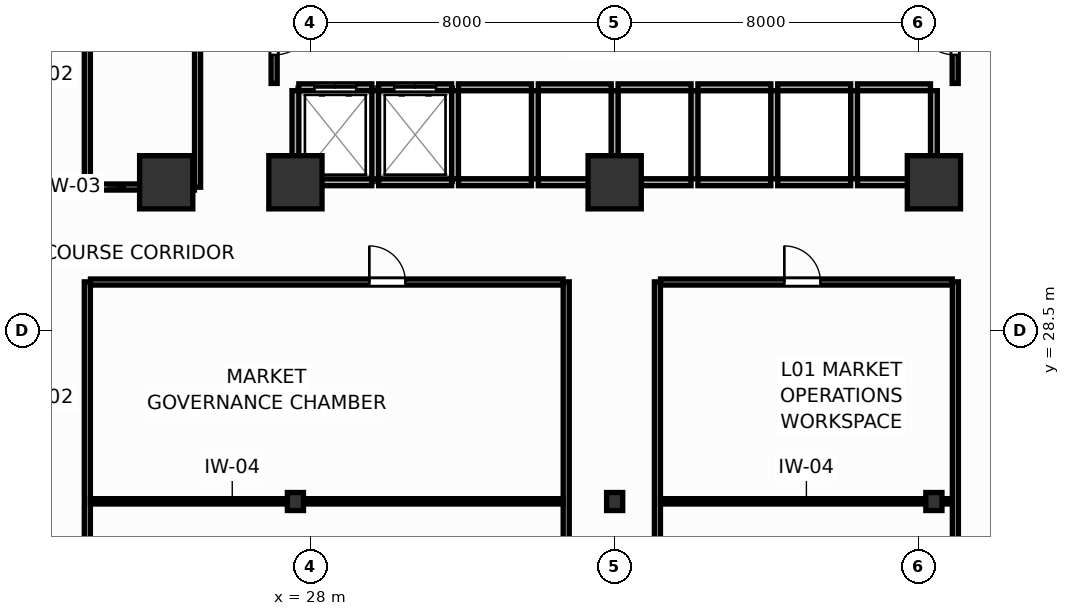
"""IFC4 building model, lengths in metres.
Left out: names, types, materials, properties, quantities, classifications, styles, units other than length and angle.
Written with IfcOpenShell. Run it as: python <this file> out.ifc"""

import sys

from ifc_helpers import new_model, si_unit, direction, frame, frame_2d, origin, origin_2d, place, context, subcontext, project, spatial, rectangle, i_section, extrude, source, transform, mapped, element, fill, save


model = new_model("IFC4")
c1 = context("Model", 3, precision=1e-05, world=origin(), true_north=direction((0.0, 1.0)))
c2 = subcontext(c1, "Body", "Model", "MODEL_VIEW")
j1 = project(units=[si_unit("LENGTHUNIT", "METRE"), si_unit("PLANEANGLEUNIT", "RADIAN")], contexts=[c1])
p1 = place(None, origin())
s1 = spatial("IfcSite", under=j1, at=p1, CompositionType="ELEMENT")
p2 = place(p1, origin())
s2 = spatial("IfcBuilding", under=s1, at=p2, CompositionType="ELEMENT")
p3 = place(p2, frame((0.0, 0.0, 4.8)))
s3 = spatial("IfcBuildingStorey", under=s2, at=p3, CompositionType="ELEMENT", Elevation=4.8)
m1 = source(origin(), c2, "Body", "SweptSolid", [
    extrude(rectangle(XDim=1.4, YDim=1.4, at=origin_2d()), origin(), (0.0, 0.0, 1.0), 4.8),
])
for number, where, z_axis, x_axis in (
    (1, (27.6, 32.4, 0.0), (0.0, 0.0, 1.0), (1.0, 0.0, 0.0)),
    (2, (44.4, 32.4, 0.0), (0.0, 0.0, 1.0), (1.0, 0.0, 0.0)),
    (3, (36.0, 32.4, 0.0), (0.0, 0.0, 1.0), (1.0, 0.0, 0.0)),
    (4, (24.2, 32.4, 0.0), (0.0, 0.0, 1.0), (1.0, 0.0, 0.0)),
):
    element("IfcColumn", number, at=place(p3, frame(where, z_axis=z_axis, x_axis=x_axis)), inside=s3, PredefinedType="COLUMN", context=c2, shape_type="MappedRepresentation", body=[
        mapped(m1, transform((0.0, 0.0, 0.0), scale=1.0)),
    ])
m2 = source(origin(), c2, "Body", "SweptSolid", [
    extrude(i_section(OverallWidth=0.424, OverallDepth=0.474, WebThickness=0.045, FlangeThickness=0.072, FilletRadius=0.015, at=origin_2d()), origin(), (0.0, 0.0, 1.0), 4.8),
])
for number, where, z_axis, x_axis in (
    (5, (27.6, 24.0, 0.0), (0.0, 0.0, 1.0), (1.0, 0.0, 0.0)),
    (6, (44.4, 24.0, 0.0), (0.0, 0.0, 1.0), (1.0, 0.0, 0.0)),
    (7, (36.0, 24.0, 0.0), (0.0, 0.0, 1.0), (1.0, 0.0, 0.0)),
):
    element("IfcColumn", number, at=place(p3, frame(where, z_axis=z_axis, x_axis=x_axis)), inside=s3, PredefinedType="COLUMN", context=c2, shape_type="MappedRepresentation", body=[
        mapped(m2, transform((0.0, 0.0, 0.0), scale=1.0)),
    ])
p4 = place(p3, frame((27.69, 34.9, 0.0), z_axis=(0.0, 0.0, 1.0), x_axis=(1.0, 0.0, 0.0)))
e8 = element("IfcWall", 8, at=p4, inside=s3, PredefinedType="PARTITIONING", context=c2, shape_type="SweptSolid", body=[
    extrude(rectangle(XDim=1.92, YDim=0.18, at=frame_2d((0.96, 0.0))), origin(), (0.0, 0.0, 1.0), 4.52),
])
p5 = place(p4, frame((0.41, 0.0, 0.0)))
e9 = element("IfcOpeningElement", 9, at=p5, cuts=e8, PredefinedType="OPENING", context=c2, shape_type="SweptSolid", body=[
    extrude(rectangle(XDim=1.1, YDim=2.1, at=frame_2d((0.55, 1.05))), frame((0.0, 0.1, 0.0), z_axis=(0.0, -1.0, 0.0), x_axis=(1.0, 0.0, 0.0)), (0.0, 0.0, 1.0), 0.2),
])
p6 = place(p3, frame((27.69, 32.4, 0.0), z_axis=(0.0, 0.0, 1.0), x_axis=(1.0, 0.0, 0.0)))
e10 = element("IfcWall", 10, at=p6, inside=s3, PredefinedType="PARTITIONING", context=c2, shape_type="SweptSolid", body=[
    extrude(rectangle(XDim=1.92, YDim=0.18, at=frame_2d((0.96, 0.0))), origin(), (0.0, 0.0, 1.0), 3.82),
])
p7 = place(p3, frame((27.6, 32.49, 0.0), z_axis=(0.0, 0.0, 1.0), x_axis=(0.0, 1.0, 0.0)))
e11 = element("IfcWall", 11, at=p7, inside=s3, PredefinedType="PARTITIONING", context=c2, shape_type="SweptSolid", body=[
    extrude(rectangle(XDim=2.32, YDim=0.18, at=frame_2d((1.16, 0.0))), origin(), (0.0, 0.0, 1.0), 4.52),
])
p8 = place(p3, frame((29.79, 34.9, 0.0), z_axis=(0.0, 0.0, 1.0), x_axis=(1.0, 0.0, 0.0)))
e12 = element("IfcWall", 12, at=p8, inside=s3, PredefinedType="PARTITIONING", context=c2, shape_type="SweptSolid", body=[
    extrude(rectangle(XDim=1.92, YDim=0.18, at=frame_2d((0.96, 0.0))), origin(), (0.0, 0.0, 1.0), 4.52),
])
p9 = place(p8, frame((0.41, 0.0, 0.0)))
e13 = element("IfcOpeningElement", 13, at=p9, cuts=e12, PredefinedType="OPENING", context=c2, shape_type="SweptSolid", body=[
    extrude(rectangle(XDim=1.1, YDim=2.1, at=frame_2d((0.55, 1.05))), frame((0.0, 0.1, 0.0), z_axis=(0.0, -1.0, 0.0), x_axis=(1.0, 0.0, 0.0)), (0.0, 0.0, 1.0), 0.2),
])
p10 = place(p3, frame((29.79, 32.4, 0.0), z_axis=(0.0, 0.0, 1.0), x_axis=(1.0, 0.0, 0.0)))
e14 = element("IfcWall", 14, at=p10, inside=s3, PredefinedType="PARTITIONING", context=c2, shape_type="SweptSolid", body=[
    extrude(rectangle(XDim=1.92, YDim=0.18, at=frame_2d((0.96, 0.0))), origin(), (0.0, 0.0, 1.0), 3.82),
])
p11 = place(p3, frame((29.7, 32.49, 0.0), z_axis=(0.0, 0.0, 1.0), x_axis=(0.0, 1.0, 0.0)))
e15 = element("IfcWall", 15, at=p11, inside=s3, PredefinedType="PARTITIONING", context=c2, shape_type="SweptSolid", body=[
    extrude(rectangle(XDim=2.32, YDim=0.18, at=frame_2d((1.16, 0.0))), origin(), (0.0, 0.0, 1.0), 4.52),
])
p12 = place(p3, frame((31.89, 34.9, 0.0), z_axis=(0.0, 0.0, 1.0), x_axis=(1.0, 0.0, 0.0)))
e16 = element("IfcWall", 16, at=p12, inside=s3, PredefinedType="PARTITIONING", context=c2, shape_type="SweptSolid", body=[
    extrude(rectangle(XDim=1.92, YDim=0.18, at=frame_2d((0.96, 0.0))), origin(), (0.0, 0.0, 1.0), 4.52),
])
p13 = place(p3, frame((31.89, 32.4, 0.0), z_axis=(0.0, 0.0, 1.0), x_axis=(1.0, 0.0, 0.0)))
e17 = element("IfcWall", 17, at=p13, inside=s3, PredefinedType="PARTITIONING", context=c2, shape_type="SweptSolid", body=[
    extrude(rectangle(XDim=1.92, YDim=0.18, at=frame_2d((0.96, 0.0))), origin(), (0.0, 0.0, 1.0), 3.82),
])
p14 = place(p3, frame((31.8, 32.49, 0.0), z_axis=(0.0, 0.0, 1.0), x_axis=(0.0, 1.0, 0.0)))
e18 = element("IfcWall", 18, at=p14, inside=s3, PredefinedType="PARTITIONING", context=c2, shape_type="SweptSolid", body=[
    extrude(rectangle(XDim=2.32, YDim=0.18, at=frame_2d((1.16, 0.0))), origin(), (0.0, 0.0, 1.0), 4.52),
])
p15 = place(p3, frame((33.99, 34.9, 0.0), z_axis=(0.0, 0.0, 1.0), x_axis=(1.0, 0.0, 0.0)))
e19 = element("IfcWall", 19, at=p15, inside=s3, PredefinedType="PARTITIONING", context=c2, shape_type="SweptSolid", body=[
    extrude(rectangle(XDim=1.92, YDim=0.18, at=frame_2d((0.96, 0.0))), origin(), (0.0, 0.0, 1.0), 4.52),
])
p16 = place(p3, frame((33.99, 32.4, 0.0), z_axis=(0.0, 0.0, 1.0), x_axis=(1.0, 0.0, 0.0)))
e20 = element("IfcWall", 20, at=p16, inside=s3, PredefinedType="PARTITIONING", context=c2, shape_type="SweptSolid", body=[
    extrude(rectangle(XDim=1.92, YDim=0.18, at=frame_2d((0.96, 0.0))), origin(), (0.0, 0.0, 1.0), 3.82),
])
p17 = place(p3, frame((33.9, 32.49, 0.0), z_axis=(0.0, 0.0, 1.0), x_axis=(0.0, 1.0, 0.0)))
e21 = element("IfcWall", 21, at=p17, inside=s3, PredefinedType="PARTITIONING", context=c2, shape_type="SweptSolid", body=[
    extrude(rectangle(XDim=2.32, YDim=0.18, at=frame_2d((1.16, 0.0))), origin(), (0.0, 0.0, 1.0), 4.52),
])
p18 = place(p3, frame((36.09, 34.9, 0.0), z_axis=(0.0, 0.0, 1.0), x_axis=(1.0, 0.0, 0.0)))
e22 = element("IfcWall", 22, at=p18, inside=s3, PredefinedType="PARTITIONING", context=c2, shape_type="SweptSolid", body=[
    extrude(rectangle(XDim=1.92, YDim=0.18, at=frame_2d((0.96, 0.0))), origin(), (0.0, 0.0, 1.0), 4.52),
])
p19 = place(p3, frame((36.09, 32.4, 0.0), z_axis=(0.0, 0.0, 1.0), x_axis=(1.0, 0.0, 0.0)))
e23 = element("IfcWall", 23, at=p19, inside=s3, PredefinedType="PARTITIONING", context=c2, shape_type="SweptSolid", body=[
    extrude(rectangle(XDim=1.92, YDim=0.18, at=frame_2d((0.96, 0.0))), origin(), (0.0, 0.0, 1.0), 3.82),
])
p20 = place(p3, frame((36.0, 32.49, 0.0), z_axis=(0.0, 0.0, 1.0), x_axis=(0.0, 1.0, 0.0)))
e24 = element("IfcWall", 24, at=p20, inside=s3, PredefinedType="PARTITIONING", context=c2, shape_type="SweptSolid", body=[
    extrude(rectangle(XDim=2.32, YDim=0.18, at=frame_2d((1.16, 0.0))), origin(), (0.0, 0.0, 1.0), 4.52),
])
p21 = place(p3, frame((38.19, 34.9, 0.0), z_axis=(0.0, 0.0, 1.0), x_axis=(1.0, 0.0, 0.0)))
e25 = element("IfcWall", 25, at=p21, inside=s3, PredefinedType="PARTITIONING", context=c2, shape_type="SweptSolid", body=[
    extrude(rectangle(XDim=1.92, YDim=0.18, at=frame_2d((0.96, 0.0))), origin(), (0.0, 0.0, 1.0), 4.52),
])
p22 = place(p3, frame((38.19, 32.4, 0.0), z_axis=(0.0, 0.0, 1.0), x_axis=(1.0, 0.0, 0.0)))
e26 = element("IfcWall", 26, at=p22, inside=s3, PredefinedType="PARTITIONING", context=c2, shape_type="SweptSolid", body=[
    extrude(rectangle(XDim=1.92, YDim=0.18, at=frame_2d((0.96, 0.0))), origin(), (0.0, 0.0, 1.0), 3.82),
])
p23 = place(p3, frame((38.1, 32.49, 0.0), z_axis=(0.0, 0.0, 1.0), x_axis=(0.0, 1.0, 0.0)))
e27 = element("IfcWall", 27, at=p23, inside=s3, PredefinedType="PARTITIONING", context=c2, shape_type="SweptSolid", body=[
    extrude(rectangle(XDim=2.32, YDim=0.18, at=frame_2d((1.16, 0.0))), origin(), (0.0, 0.0, 1.0), 4.52),
])
p24 = place(p3, frame((40.29, 34.9, 0.0), z_axis=(0.0, 0.0, 1.0), x_axis=(1.0, 0.0, 0.0)))
e28 = element("IfcWall", 28, at=p24, inside=s3, PredefinedType="PARTITIONING", context=c2, shape_type="SweptSolid", body=[
    extrude(rectangle(XDim=1.92, YDim=0.18, at=frame_2d((0.96, 0.0))), origin(), (0.0, 0.0, 1.0), 4.52),
])
p25 = place(p3, frame((40.29, 32.4, 0.0), z_axis=(0.0, 0.0, 1.0), x_axis=(1.0, 0.0, 0.0)))
e29 = element("IfcWall", 29, at=p25, inside=s3, PredefinedType="PARTITIONING", context=c2, shape_type="SweptSolid", body=[
    extrude(rectangle(XDim=1.92, YDim=0.18, at=frame_2d((0.96, 0.0))), origin(), (0.0, 0.0, 1.0), 3.82),
])
p26 = place(p3, frame((40.2, 32.49, 0.0), z_axis=(0.0, 0.0, 1.0), x_axis=(0.0, 1.0, 0.0)))
e30 = element("IfcWall", 30, at=p26, inside=s3, PredefinedType="PARTITIONING", context=c2, shape_type="SweptSolid", body=[
    extrude(rectangle(XDim=2.32, YDim=0.18, at=frame_2d((1.16, 0.0))), origin(), (0.0, 0.0, 1.0), 4.52),
])
p27 = place(p3, frame((42.39, 34.9, 0.0), z_axis=(0.0, 0.0, 1.0), x_axis=(1.0, 0.0, 0.0)))
e31 = element("IfcWall", 31, at=p27, inside=s3, PredefinedType="PARTITIONING", context=c2, shape_type="SweptSolid", body=[
    extrude(rectangle(XDim=1.92, YDim=0.18, at=frame_2d((0.96, 0.0))), origin(), (0.0, 0.0, 1.0), 4.52),
])
p28 = place(p3, frame((42.39, 32.4, 0.0), z_axis=(0.0, 0.0, 1.0), x_axis=(1.0, 0.0, 0.0)))
e32 = element("IfcWall", 32, at=p28, inside=s3, PredefinedType="PARTITIONING", context=c2, shape_type="SweptSolid", body=[
    extrude(rectangle(XDim=1.92, YDim=0.18, at=frame_2d((0.96, 0.0))), origin(), (0.0, 0.0, 1.0), 3.82),
])
for number, where, z_axis, x_axis in (
    (33, (42.3, 32.49, 0.0), (0.0, 0.0, 1.0), (0.0, 1.0, 0.0)),
    (34, (44.4, 32.49, 0.0), (0.0, 0.0, 1.0), (0.0, 1.0, 0.0)),
):
    element("IfcWall", number, at=place(p3, frame(where, z_axis=z_axis, x_axis=x_axis)), inside=s3, PredefinedType="PARTITIONING", context=c2, shape_type="SweptSolid", body=[
        extrude(rectangle(XDim=2.32, YDim=0.18, at=frame_2d((1.16, 0.0))), origin(), (0.0, 0.0, 1.0), 4.52),
    ])
p29 = place(p3, frame((27.04, 35.0, 0.0), z_axis=(0.0, 0.0, 1.0), x_axis=(0.0, 1.0, 0.0)))
e35 = element("IfcWall", 35, at=p29, inside=s3, PredefinedType="PARTITIONING", context=c2, shape_type="SweptSolid", body=[
    extrude(rectangle(XDim=2.65, YDim=0.16, at=frame_2d((1.325, 0.0))), origin(), (0.0, 0.0, 1.0), 4.52),
])
p30 = place(p29, frame((0.75, 0.0, 0.0)))
e36 = element("IfcOpeningElement", 36, at=p30, cuts=e35, PredefinedType="OPENING", context=c2, shape_type="SweptSolid", body=[
    extrude(rectangle(XDim=1.05, YDim=2.1, at=frame_2d((0.525, 1.05))), frame((0.0, 0.09, 0.0), z_axis=(0.0, -1.0, 0.0), x_axis=(1.0, 0.0, 0.0)), (0.0, 0.0, 1.0), 0.18),
])
p31 = place(p3, frame((44.96, 35.0, 0.0), z_axis=(0.0, 0.0, 1.0), x_axis=(0.0, 1.0, 0.0)))
e37 = element("IfcWall", 37, at=p31, inside=s3, PredefinedType="PARTITIONING", context=c2, shape_type="SweptSolid", body=[
    extrude(rectangle(XDim=2.65, YDim=0.16, at=frame_2d((1.325, 0.0))), origin(), (0.0, 0.0, 1.0), 4.52),
])
p32 = place(p31, frame((0.75, 0.0, 0.0)))
e38 = element("IfcOpeningElement", 38, at=p32, cuts=e37, PredefinedType="OPENING", context=c2, shape_type="SweptSolid", body=[
    extrude(rectangle(XDim=1.05, YDim=2.1, at=frame_2d((0.525, 1.05))), frame((0.0, 0.09, 0.0), z_axis=(0.0, -1.0, 0.0), x_axis=(1.0, 0.0, 0.0)), (0.0, 0.0, 1.0), 0.18),
])
p33 = place(p3, frame((44.965, 3.02, 0.0), z_axis=(0.0, 0.0, 1.0), x_axis=(0.0, 1.0, 0.0)))
e39 = element("IfcWall", 39, at=p33, inside=s3, PredefinedType="PARTITIONING", context=c2, shape_type="SweptSolid", body=[
    extrude(rectangle(XDim=26.76, YDim=0.16, at=frame_2d((13.38, 0.0))), origin(), (0.0, 0.0, 1.0), 4.52),
])
p34 = place(p33, frame((6.82, 0.0, 0.0)))
e40 = element("IfcOpeningElement", 40, at=p34, cuts=e39, PredefinedType="OPENING", context=c2, shape_type="SweptSolid", body=[
    extrude(rectangle(XDim=0.95, YDim=2.05, at=frame_2d((0.475, 1.025))), frame((0.0, 0.09, 0.0), z_axis=(0.0, -1.0, 0.0), x_axis=(1.0, 0.0, 0.0)), (0.0, 0.0, 1.0), 0.18),
])
p35 = place(p3, frame((37.125, 3.02, 0.0), z_axis=(0.0, 0.0, 1.0), x_axis=(0.0, 1.0, 0.0)))
e41 = element("IfcWall", 41, at=p35, inside=s3, PredefinedType="PARTITIONING", context=c2, shape_type="SweptSolid", body=[
    extrude(rectangle(XDim=26.76, YDim=0.16, at=frame_2d((13.38, 0.0))), origin(), (0.0, 0.0, 1.0), 4.52),
])
p36 = place(p3, frame((22.125, 3.02, 0.0), z_axis=(0.0, 0.0, 1.0), x_axis=(0.0, 1.0, 0.0)))
e42 = element("IfcWall", 42, at=p36, inside=s3, PredefinedType="PARTITIONING", context=c2, shape_type="SweptSolid", body=[
    extrude(rectangle(XDim=26.76, YDim=0.16, at=frame_2d((13.38, 0.0))), origin(), (0.0, 0.0, 1.0), 4.52),
])
p37 = place(p36, frame((10.07, 0.0, 0.0)))
e43 = element("IfcOpeningElement", 43, at=p37, cuts=e42, PredefinedType="OPENING", context=c2, shape_type="SweptSolid", body=[
    extrude(rectangle(XDim=0.95, YDim=2.05, at=frame_2d((0.475, 1.025))), frame((0.0, 0.09, 0.0), z_axis=(0.0, -1.0, 0.0), x_axis=(1.0, 0.0, 0.0)), (0.0, 0.0, 1.0), 0.18),
])
p38 = place(p3, frame((34.725, 3.02, 0.0), z_axis=(0.0, 0.0, 1.0), x_axis=(0.0, 1.0, 0.0)))
e44 = element("IfcWall", 44, at=p38, inside=s3, PredefinedType="PARTITIONING", context=c2, shape_type="SweptSolid", body=[
    extrude(rectangle(XDim=26.76, YDim=0.16, at=frame_2d((13.38, 0.0))), origin(), (0.0, 0.0, 1.0), 4.52),
])
p39 = place(p3, frame((22.125, 32.27, 0.0), z_axis=(0.0, 0.0, 1.0), x_axis=(0.0, 1.0, 0.0)))
e45 = element("IfcWall", 45, at=p39, inside=s3, PredefinedType="PARTITIONING", context=c2, shape_type="SweptSolid", body=[
    extrude(rectangle(XDim=26.71, YDim=0.16, at=frame_2d((13.355, 0.0))), origin(), (0.0, 0.0, 1.0), 4.52),
])
p40 = place(p39, frame((5.695, 0.0, 0.0)))
e46 = element("IfcOpeningElement", 46, at=p40, cuts=e45, PredefinedType="OPENING", context=c2, shape_type="SweptSolid", body=[
    extrude(rectangle(XDim=0.95, YDim=2.05, at=frame_2d((0.475, 1.025))), frame((0.0, 0.09, 0.0), z_axis=(0.0, -1.0, 0.0), x_axis=(1.0, 0.0, 0.0)), (0.0, 0.0, 1.0), 0.18),
])
p41 = place(p39, frame((18.833, 0.0, 0.0)))
e47 = element("IfcOpeningElement", 47, at=p41, cuts=e45, PredefinedType="OPENING", context=c2, shape_type="SweptSolid", body=[
    extrude(rectangle(XDim=0.95, YDim=2.05, at=frame_2d((0.475, 1.025))), frame((0.0, 0.09, 0.0), z_axis=(0.0, -1.0, 0.0), x_axis=(1.0, 0.0, 0.0)), (0.0, 0.0, 1.0), 0.18),
])
p42 = place(p3, frame((25.025, 32.27, 0.0), z_axis=(0.0, 0.0, 1.0), x_axis=(0.0, 1.0, 0.0)))
e48 = element("IfcWall", 48, at=p42, inside=s3, PredefinedType="PARTITIONING", context=c2, shape_type="SweptSolid", body=[
    extrude(rectangle(XDim=26.71, YDim=0.16, at=frame_2d((13.355, 0.0))), origin(), (0.0, 0.0, 1.0), 4.52),
])
p43 = place(p3, frame((22.207, 29.775, 0.0), z_axis=(0.0, 0.0, 1.0), x_axis=(1.0, 0.0, 0.0)))
e49 = element("IfcWall", 49, at=p43, inside=s3, PredefinedType="PARTITIONING", context=c2, shape_type="SweptSolid", body=[
    extrude(rectangle(XDim=12.436, YDim=0.16, at=frame_2d((6.218, 0.0))), origin(), (0.0, 0.0, 1.0), 4.52),
])
p44 = place(p43, frame((7.338, 0.0, 0.0)))
e50 = element("IfcOpeningElement", 50, at=p44, cuts=e49, PredefinedType="OPENING", context=c2, shape_type="SweptSolid", body=[
    extrude(rectangle(XDim=0.95, YDim=2.05, at=frame_2d((0.475, 1.025))), frame((0.0, 0.09, 0.0), z_axis=(0.0, -1.0, 0.0), x_axis=(1.0, 0.0, 0.0)), (0.0, 0.0, 1.0), 0.18),
])
p45 = place(p3, frame((37.207, 29.775, 0.0), z_axis=(0.0, 0.0, 1.0), x_axis=(1.0, 0.0, 0.0)))
e51 = element("IfcWall", 51, at=p45, inside=s3, PredefinedType="PARTITIONING", context=c2, shape_type="SweptSolid", body=[
    extrude(rectangle(XDim=7.676, YDim=0.16, at=frame_2d((3.838, 0.0))), origin(), (0.0, 0.0, 1.0), 4.52),
])
p46 = place(p45, frame((3.258, 0.0, 0.0)))
e52 = element("IfcOpeningElement", 52, at=p46, cuts=e51, PredefinedType="OPENING", context=c2, shape_type="SweptSolid", body=[
    extrude(rectangle(XDim=0.95, YDim=2.05, at=frame_2d((0.475, 1.025))), frame((0.0, 0.09, 0.0), z_axis=(0.0, -1.0, 0.0), x_axis=(1.0, 0.0, 0.0)), (0.0, 0.0, 1.0), 0.18),
])
p47 = place(p3, frame((22.207, 32.275, 0.0), z_axis=(0.0, 0.0, 1.0), x_axis=(1.0, 0.0, 0.0)))
e53 = element("IfcWall", 53, at=p47, inside=s3, PredefinedType="PARTITIONING", context=c2, shape_type="SweptSolid", body=[
    extrude(rectangle(XDim=2.736, YDim=0.16, at=frame_2d((1.368, 0.0))), origin(), (0.0, 0.0, 1.0), 3.82),
])
p48 = place(p3, frame((22.207, 24.005, 0.0), z_axis=(0.0, 0.0, 1.0), x_axis=(1.0, 0.0, 0.0)))
e54 = element("IfcWall", 54, at=p48, inside=s3, PredefinedType="PARTITIONING", context=c2, shape_type="SweptSolid", body=[
    extrude(rectangle(XDim=12.436, YDim=0.14, at=frame_2d((6.218, 0.0))), origin(), (0.0, 0.0, 1.0), 3.92),
])
p49 = place(p3, frame((37.207, 24.005, 0.0), z_axis=(0.0, 0.0, 1.0), x_axis=(1.0, 0.0, 0.0)))
e55 = element("IfcWall", 55, at=p49, inside=s3, PredefinedType="PARTITIONING", context=c2, shape_type="SweptSolid", body=[
    extrude(rectangle(XDim=7.676, YDim=0.14, at=frame_2d((3.838, 0.0))), origin(), (0.0, 0.0, 1.0), 3.92),
])
p50 = place(p5, origin())
e56 = element("IfcDoor", 56, at=p50, inside=s3, OperationType="DOUBLE_DOOR_SLIDING", PredefinedType="DOOR", context=c2, shape_type="SweptSolid", body=[
    extrude(rectangle(XDim=1.1, YDim=2.1, at=frame_2d((0.55, 1.05))), frame((0.0, 0.025, 0.0), z_axis=(0.0, -1.0, 0.0), x_axis=(1.0, 0.0, 0.0)), (0.0, 0.0, 1.0), 0.05),
])
fill(e9, e56)
p51 = place(p9, origin())
e57 = element("IfcDoor", 57, at=p51, inside=s3, OperationType="DOUBLE_DOOR_SLIDING", PredefinedType="DOOR", context=c2, shape_type="SweptSolid", body=[
    extrude(rectangle(XDim=1.1, YDim=2.1, at=frame_2d((0.55, 1.05))), frame((0.0, 0.025, 0.0), z_axis=(0.0, -1.0, 0.0), x_axis=(1.0, 0.0, 0.0)), (0.0, 0.0, 1.0), 0.05),
])
fill(e13, e57)
p52 = place(p30, frame((1.05, 0.0, 0.0), z_axis=(0.0, 0.0, 1.0), x_axis=(-1.0, 0.0, 0.0)))
e58 = element("IfcDoor", 58, at=p52, inside=s3, OperationType="SINGLE_SWING_LEFT", PredefinedType="DOOR", context=c2, shape_type="SweptSolid", body=[
    extrude(rectangle(XDim=1.05, YDim=2.1, at=frame_2d((0.525, 1.05))), frame((0.0, 0.025, 0.0), z_axis=(0.0, -1.0, 0.0), x_axis=(1.0, 0.0, 0.0)), (0.0, 0.0, 1.0), 0.05),
])
fill(e36, e58)
p53 = place(p32, origin())
e59 = element("IfcDoor", 59, at=p53, inside=s3, OperationType="SINGLE_SWING_RIGHT", PredefinedType="DOOR", context=c2, shape_type="SweptSolid", body=[
    extrude(rectangle(XDim=1.05, YDim=2.1, at=frame_2d((0.525, 1.05))), frame((0.0, 0.025, 0.0), z_axis=(0.0, -1.0, 0.0), x_axis=(1.0, 0.0, 0.0)), (0.0, 0.0, 1.0), 0.05),
])
fill(e38, e59)
p54 = place(p44, origin())
e60 = element("IfcDoor", 60, at=p54, inside=s3, OperationType="SINGLE_SWING_LEFT", PredefinedType="DOOR", context=c2, shape_type="SweptSolid", body=[
    extrude(rectangle(XDim=0.95, YDim=2.05, at=frame_2d((0.475, 1.025))), frame((0.0, 0.025, 0.0), z_axis=(0.0, -1.0, 0.0), x_axis=(1.0, 0.0, 0.0)), (0.0, 0.0, 1.0), 0.05),
])
fill(e50, e60)
p55 = place(p46, origin())
e61 = element("IfcDoor", 61, at=p55, inside=s3, OperationType="SINGLE_SWING_LEFT", PredefinedType="DOOR", context=c2, shape_type="SweptSolid", body=[
    extrude(rectangle(XDim=0.95, YDim=2.05, at=frame_2d((0.475, 1.025))), frame((0.0, 0.025, 0.0), z_axis=(0.0, -1.0, 0.0), x_axis=(1.0, 0.0, 0.0)), (0.0, 0.0, 1.0), 0.05),
])
fill(e52, e61)
save(model, sys.argv[1])
